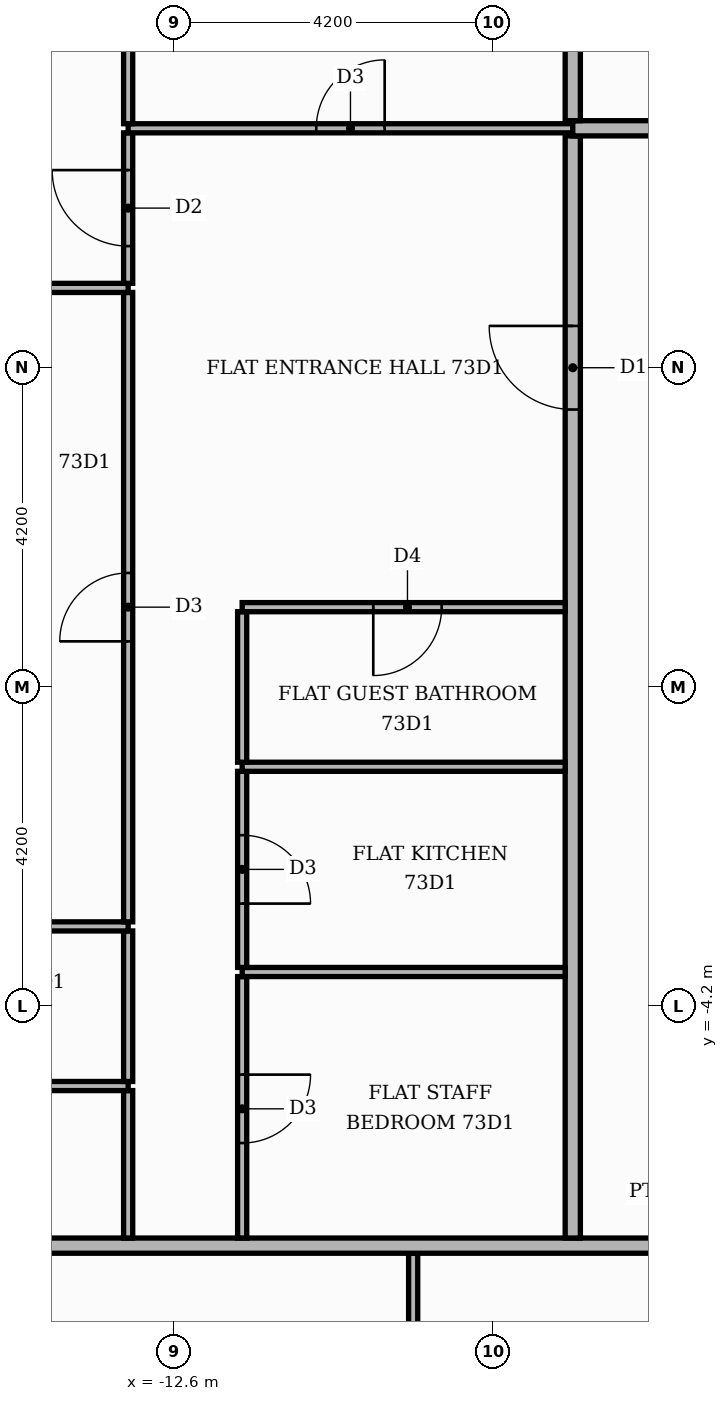
"""IFC4 building model, lengths in metres.
Left out: names, types, materials, properties, quantities, classifications, styles, units other than length and angle.
Written with IfcOpenShell. Run it as: python <this file> out.ifc"""

import sys

from ifc_helpers import new_model, si_unit, direction, frame, frame_2d, origin, place, context, subcontext, project, spatial, rectangle, extrude, element, fill, save


model = new_model("IFC4")
c1 = context("Model", 3, precision=1e-05, world=origin(), true_north=direction((0.0, 1.0)))
c2 = subcontext(c1, "Body", "Model", "MODEL_VIEW")
j1 = project(units=[si_unit("LENGTHUNIT", "METRE"), si_unit("PLANEANGLEUNIT", "RADIAN")], contexts=[c1])
p1 = place(None, origin())
s1 = spatial("IfcSite", under=j1, at=p1, CompositionType="ELEMENT")
p2 = place(p1, origin())
s2 = spatial("IfcBuilding", under=s1, at=p2, CompositionType="ELEMENT")
p3 = place(p2, frame((0.0, 0.0, 304.5)))
s3 = spatial("IfcBuildingStorey", under=s2, at=p3, CompositionType="ELEMENT", Elevation=304.5)
p4 = place(p3, frame((-9.45, -12.84, 0.0), z_axis=(0.0, 0.0, 1.0), x_axis=(0.0, 1.0, 0.0)))
e1 = element("IfcWall", 1, at=p4, inside=s3, PredefinedType="PARTITIONING", context=c2, shape_type="SweptSolid", body=[
    extrude(rectangle(XDim=5.39, YDim=0.12, at=frame_2d((2.695, 0.0))), origin(), (0.0, 0.0, 1.0), 3.55),
])
p5 = place(p4, frame((2.265, 0.0, 0.0)))
e2 = element("IfcOpeningElement", 2, at=p5, cuts=e1, PredefinedType="OPENING", context=c2, shape_type="SweptSolid", body=[
    extrude(rectangle(XDim=0.9, YDim=2.1, at=frame_2d((0.45, 1.05))), frame((0.0, 0.07, 0.0), z_axis=(0.0, -1.0, 0.0), x_axis=(1.0, 0.0, 0.0)), (0.0, 0.0, 1.0), 0.14),
])
p6 = place(p3, frame((-18.5, -7.35, 0.0), z_axis=(0.0, 0.0, 1.0), x_axis=(1.0, 0.0, 0.0)))
e3 = element("IfcWall", 3, at=p6, inside=s3, PredefinedType="PARTITIONING", context=c2, shape_type="SweptSolid", body=[
    extrude(rectangle(XDim=25.85, YDim=0.2, at=frame_2d((12.925, 0.0))), origin(), (0.0, 0.0, 1.0), 3.55),
])
p7 = place(p6, frame((12.7, 0.0, 0.0)))
e4 = element("IfcOpeningElement", 4, at=p7, cuts=e3, PredefinedType="OPENING", context=c2, shape_type="SweptSolid", body=[
    extrude(rectangle(XDim=1.1, YDim=2.4, at=frame_2d((0.55, 1.2))), frame((0.0, 0.11, 0.0), z_axis=(0.0, -1.0, 0.0), x_axis=(1.0, 0.0, 0.0)), (0.0, 0.0, 1.0), 0.22),
])
p8 = place(p3, frame((-13.2, -7.25, 0.0), z_axis=(0.0, 0.0, 1.0), x_axis=(0.0, 1.0, 0.0)))
e5 = element("IfcWall", 5, at=p8, inside=s3, PredefinedType="PARTITIONING", context=c2, shape_type="SweptSolid", body=[
    extrude(rectangle(XDim=1.94, YDim=0.12, at=frame_2d((0.97, 0.0))), origin(), (0.0, 0.0, 1.0), 3.55),
])
p9 = place(p3, frame((-11.7, -7.25, 0.0), z_axis=(0.0, 0.0, 1.0), x_axis=(0.0, 1.0, 0.0)))
e6 = element("IfcWall", 6, at=p9, inside=s3, PredefinedType="PARTITIONING", context=c2, shape_type="SweptSolid", body=[
    extrude(rectangle(XDim=3.44, YDim=0.12, at=frame_2d((1.72, 0.0))), origin(), (0.0, 0.0, 1.0), 3.55),
])
p10 = place(p9, frame((1.25, 0.0, 0.0)))
e7 = element("IfcOpeningElement", 7, at=p10, cuts=e6, PredefinedType="OPENING", context=c2, shape_type="SweptSolid", body=[
    extrude(rectangle(XDim=0.9, YDim=2.1, at=frame_2d((0.45, 1.05))), frame((0.0, 0.07, 0.0), z_axis=(0.0, -1.0, 0.0), x_axis=(1.0, 0.0, 0.0)), (0.0, 0.0, 1.0), 0.14),
])
p11 = place(p3, frame((-7.35, -7.25, 0.0), z_axis=(0.0, 0.0, 1.0), x_axis=(0.0, 1.0, 0.0)))
e8 = element("IfcWall", 8, at=p11, inside=s3, PredefinedType="PARTITIONING", context=c2, shape_type="SweptSolid", body=[
    extrude(rectangle(XDim=14.5, YDim=0.2, at=frame_2d((7.25, 0.0))), origin(), (0.0, 0.0, 1.0), 3.55),
])
p12 = place(p11, frame((10.9, 0.0, 0.0)))
e9 = element("IfcOpeningElement", 9, at=p12, cuts=e8, PredefinedType="OPENING", context=c2, shape_type="SweptSolid", body=[
    extrude(rectangle(XDim=1.1, YDim=2.4, at=frame_2d((0.55, 1.2))), frame((0.0, 0.11, 0.0), z_axis=(0.0, -1.0, 0.0), x_axis=(1.0, 0.0, 0.0)), (0.0, 0.0, 1.0), 0.22),
])
p13 = place(p3, frame((-18.5, -5.25, 0.0), z_axis=(0.0, 0.0, 1.0), x_axis=(1.0, 0.0, 0.0)))
e10 = element("IfcWall", 10, at=p13, inside=s3, PredefinedType="PARTITIONING", context=c2, shape_type="SweptSolid", body=[
    extrude(rectangle(XDim=5.3, YDim=0.12, at=frame_2d((2.65, 0.0))), origin(), (0.0, 0.0, 1.0), 3.55),
])
p14 = place(p13, frame((2.05, 0.0, 0.0)))
e11 = element("IfcOpeningElement", 11, at=p14, cuts=e10, PredefinedType="OPENING", context=c2, shape_type="SweptSolid", body=[
    extrude(rectangle(XDim=0.9, YDim=2.1, at=frame_2d((0.45, 1.05))), frame((0.0, 0.07, 0.0), z_axis=(0.0, -1.0, 0.0), x_axis=(1.0, 0.0, 0.0)), (0.0, 0.0, 1.0), 0.14),
])
p15 = place(p3, frame((-13.2, -5.19, 0.0), z_axis=(0.0, 0.0, 1.0), x_axis=(0.0, 1.0, 0.0)))
e12 = element("IfcWall", 12, at=p15, inside=s3, PredefinedType="PARTITIONING", context=c2, shape_type="SweptSolid", body=[
    extrude(rectangle(XDim=1.98, YDim=0.12, at=frame_2d((0.99, 0.0))), origin(), (0.0, 0.0, 1.0), 3.55),
])
p16 = place(p3, frame((-11.7, -3.75, 0.0), z_axis=(0.0, 0.0, 1.0), x_axis=(1.0, 0.0, 0.0)))
e13 = element("IfcWall", 13, at=p16, inside=s3, PredefinedType="PARTITIONING", context=c2, shape_type="SweptSolid", body=[
    extrude(rectangle(XDim=4.25, YDim=0.12, at=frame_2d((2.125, 0.0))), origin(), (0.0, 0.0, 1.0), 3.55),
])
p17 = place(p3, frame((-11.7, -3.69, 0.0), z_axis=(0.0, 0.0, 1.0), x_axis=(0.0, 1.0, 0.0)))
e14 = element("IfcWall", 14, at=p17, inside=s3, PredefinedType="PARTITIONING", context=c2, shape_type="SweptSolid", body=[
    extrude(rectangle(XDim=2.58, YDim=0.12, at=frame_2d((1.29, 0.0))), origin(), (0.0, 0.0, 1.0), 3.55),
])
p18 = place(p17, frame((0.84, 0.0, 0.0)))
e15 = element("IfcOpeningElement", 15, at=p18, cuts=e14, PredefinedType="OPENING", context=c2, shape_type="SweptSolid", body=[
    extrude(rectangle(XDim=0.9, YDim=2.1, at=frame_2d((0.45, 1.05))), frame((0.0, 0.07, 0.0), z_axis=(0.0, -1.0, 0.0), x_axis=(1.0, 0.0, 0.0)), (0.0, 0.0, 1.0), 0.14),
])
p19 = place(p3, frame((-18.5, -3.15, 0.0), z_axis=(0.0, 0.0, 1.0), x_axis=(1.0, 0.0, 0.0)))
e16 = element("IfcWall", 16, at=p19, inside=s3, PredefinedType="PARTITIONING", context=c2, shape_type="SweptSolid", body=[
    extrude(rectangle(XDim=5.3, YDim=0.12, at=frame_2d((2.65, 0.0))), origin(), (0.0, 0.0, 1.0), 3.55),
])
p20 = place(p19, frame((2.05, 0.0, 0.0)))
e17 = element("IfcOpeningElement", 17, at=p20, cuts=e16, PredefinedType="OPENING", context=c2, shape_type="SweptSolid", body=[
    extrude(rectangle(XDim=0.9, YDim=2.1, at=frame_2d((0.45, 1.05))), frame((0.0, 0.07, 0.0), z_axis=(0.0, -1.0, 0.0), x_axis=(1.0, 0.0, 0.0)), (0.0, 0.0, 1.0), 0.14),
])
p21 = place(p3, frame((-13.2, -3.09, 0.0), z_axis=(0.0, 0.0, 1.0), x_axis=(0.0, 1.0, 0.0)))
e18 = element("IfcWall", 18, at=p21, inside=s3, PredefinedType="PARTITIONING", context=c2, shape_type="SweptSolid", body=[
    extrude(rectangle(XDim=8.28, YDim=0.12, at=frame_2d((4.14, 0.0))), origin(), (0.0, 0.0, 1.0), 3.55),
])
p22 = place(p21, frame((3.69, 0.0, 0.0)))
e19 = element("IfcOpeningElement", 19, at=p22, cuts=e18, PredefinedType="OPENING", context=c2, shape_type="SweptSolid", body=[
    extrude(rectangle(XDim=0.9, YDim=2.1, at=frame_2d((0.45, 1.05))), frame((0.0, 0.07, 0.0), z_axis=(0.0, -1.0, 0.0), x_axis=(1.0, 0.0, 0.0)), (0.0, 0.0, 1.0), 0.14),
])
p23 = place(p3, frame((-11.7, -1.05, 0.0), z_axis=(0.0, 0.0, 1.0), x_axis=(1.0, 0.0, 0.0)))
e20 = element("IfcWall", 20, at=p23, inside=s3, PredefinedType="PARTITIONING", context=c2, shape_type="SweptSolid", body=[
    extrude(rectangle(XDim=4.25, YDim=0.12, at=frame_2d((2.125, 0.0))), origin(), (0.0, 0.0, 1.0), 3.55),
])
p24 = place(p3, frame((-11.7, -0.99, 0.0), z_axis=(0.0, 0.0, 1.0), x_axis=(0.0, 1.0, 0.0)))
e21 = element("IfcWall", 21, at=p24, inside=s3, PredefinedType="PARTITIONING", context=c2, shape_type="SweptSolid", body=[
    extrude(rectangle(XDim=1.98, YDim=0.12, at=frame_2d((0.99, 0.0))), origin(), (0.0, 0.0, 1.0), 3.55),
])
p25 = place(p3, frame((-11.7, 1.05, 0.0), z_axis=(0.0, 0.0, 1.0), x_axis=(1.0, 0.0, 0.0)))
e22 = element("IfcWall", 22, at=p25, inside=s3, PredefinedType="PARTITIONING", context=c2, shape_type="SweptSolid", body=[
    extrude(rectangle(XDim=4.25, YDim=0.12, at=frame_2d((2.125, 0.0))), origin(), (0.0, 0.0, 1.0), 3.55),
])
p26 = place(p25, frame((1.725, 0.0, 0.0)))
e23 = element("IfcOpeningElement", 23, at=p26, cuts=e22, PredefinedType="OPENING", context=c2, shape_type="SweptSolid", body=[
    extrude(rectangle(XDim=0.9, YDim=2.1, at=frame_2d((0.45, 1.05))), frame((0.0, 0.07, 0.0), z_axis=(0.0, -1.0, 0.0), x_axis=(1.0, 0.0, 0.0)), (0.0, 0.0, 1.0), 0.14),
])
p27 = place(p3, frame((-18.5, 5.25, 0.0), z_axis=(0.0, 0.0, 1.0), x_axis=(1.0, 0.0, 0.0)))
e24 = element("IfcWall", 24, at=p27, inside=s3, PredefinedType="PARTITIONING", context=c2, shape_type="SweptSolid", body=[
    extrude(rectangle(XDim=5.3, YDim=0.12, at=frame_2d((2.65, 0.0))), origin(), (0.0, 0.0, 1.0), 3.55),
])
p28 = place(p3, frame((-13.2, 5.31, 0.0), z_axis=(0.0, 0.0, 1.0), x_axis=(0.0, 1.0, 0.0)))
e25 = element("IfcWall", 25, at=p28, inside=s3, PredefinedType="PARTITIONING", context=c2, shape_type="SweptSolid", body=[
    extrude(rectangle(XDim=1.98, YDim=0.12, at=frame_2d((0.99, 0.0))), origin(), (0.0, 0.0, 1.0), 3.55),
])
p29 = place(p28, frame((0.49, 0.0, 0.0)))
e26 = element("IfcOpeningElement", 26, at=p29, cuts=e25, PredefinedType="OPENING", context=c2, shape_type="SweptSolid", body=[
    extrude(rectangle(XDim=1.0, YDim=2.1, at=frame_2d((0.5, 1.05))), frame((0.0, 0.07, 0.0), z_axis=(0.0, -1.0, 0.0), x_axis=(1.0, 0.0, 0.0)), (0.0, 0.0, 1.0), 0.14),
])
p30 = place(p3, frame((-13.2, 7.35, 0.0), z_axis=(0.0, 0.0, 1.0), x_axis=(1.0, 0.0, 0.0)))
e27 = element("IfcWall", 27, at=p30, inside=s3, PredefinedType="PARTITIONING", context=c2, shape_type="SweptSolid", body=[
    extrude(rectangle(XDim=5.85, YDim=0.12, at=frame_2d((2.925, 0.0))), origin(), (0.0, 0.0, 1.0), 3.55),
])
p31 = place(p30, frame((2.475, 0.0, 0.0)))
e28 = element("IfcOpeningElement", 28, at=p31, cuts=e27, PredefinedType="OPENING", context=c2, shape_type="SweptSolid", body=[
    extrude(rectangle(XDim=0.9, YDim=2.1, at=frame_2d((0.45, 1.05))), frame((0.0, 0.07, 0.0), z_axis=(0.0, -1.0, 0.0), x_axis=(1.0, 0.0, 0.0)), (0.0, 0.0, 1.0), 0.14),
])
p32 = place(p3, frame((-7.35, 7.35, 0.0), z_axis=(0.0, 0.0, 1.0), x_axis=(1.0, 0.0, 0.0)))
e29 = element("IfcWall", 29, at=p32, inside=s3, PredefinedType="PARTITIONING", context=c2, shape_type="SweptSolid", body=[
    extrude(rectangle(XDim=1.85, YDim=0.2, at=frame_2d((0.925, 0.0))), origin(), (0.0, 0.0, 1.0), 3.55),
])
p33 = place(p3, frame((-13.2, 7.41, 0.0), z_axis=(0.0, 0.0, 1.0), x_axis=(0.0, 1.0, 0.0)))
e30 = element("IfcWall", 30, at=p33, inside=s3, PredefinedType="PARTITIONING", context=c2, shape_type="SweptSolid", body=[
    extrude(rectangle(XDim=4.69, YDim=0.12, at=frame_2d((2.345, 0.0))), origin(), (0.0, 0.0, 1.0), 3.55),
])
p34 = place(p3, frame((-7.35, 7.45, 0.0), z_axis=(0.0, 0.0, 1.0), x_axis=(0.0, 1.0, 0.0)))
e31 = element("IfcWall", 31, at=p34, inside=s3, PredefinedType="PARTITIONING", context=c2, shape_type="SweptSolid", body=[
    extrude(rectangle(XDim=11.05, YDim=0.2, at=frame_2d((5.525, 0.0))), origin(), (0.0, 0.0, 1.0), 3.55),
])
p35 = place(p12, origin())
e32 = element("IfcDoor", 32, at=p35, inside=s3, OperationType="SINGLE_SWING_RIGHT", PredefinedType="DOOR", context=c2, shape_type="SweptSolid", body=[
    extrude(rectangle(XDim=1.1, YDim=2.4, at=frame_2d((0.55, 1.2))), frame((0.0, 0.025, 0.0), z_axis=(0.0, -1.0, 0.0), x_axis=(1.0, 0.0, 0.0)), (0.0, 0.0, 1.0), 0.05),
])
fill(e9, e32)
p36 = place(p31, origin())
e33 = element("IfcDoor", 33, at=p36, inside=s3, OperationType="SINGLE_SWING_RIGHT", PredefinedType="DOOR", context=c2, shape_type="SweptSolid", body=[
    extrude(rectangle(XDim=0.9, YDim=2.1, at=frame_2d((0.45, 1.05))), frame((0.0, 0.025, 0.0), z_axis=(0.0, -1.0, 0.0), x_axis=(1.0, 0.0, 0.0)), (0.0, 0.0, 1.0), 0.05),
])
fill(e28, e33)
p37 = place(p26, frame((0.9, 0.0, 0.0), z_axis=(0.0, 0.0, 1.0), x_axis=(-1.0, 0.0, 0.0)))
e34 = element("IfcDoor", 34, at=p37, inside=s3, OperationType="SINGLE_SWING_LEFT", PredefinedType="DOOR", context=c2, shape_type="SweptSolid", body=[
    extrude(rectangle(XDim=0.9, YDim=2.1, at=frame_2d((0.45, 1.05))), frame((0.0, 0.025, 0.0), z_axis=(0.0, -1.0, 0.0), x_axis=(1.0, 0.0, 0.0)), (0.0, 0.0, 1.0), 0.05),
])
fill(e23, e34)
p38 = place(p18, frame((0.9, 0.0, 0.0), z_axis=(0.0, 0.0, 1.0), x_axis=(-1.0, 0.0, 0.0)))
e35 = element("IfcDoor", 35, at=p38, inside=s3, OperationType="SINGLE_SWING_LEFT", PredefinedType="DOOR", context=c2, shape_type="SweptSolid", body=[
    extrude(rectangle(XDim=0.9, YDim=2.1, at=frame_2d((0.45, 1.05))), frame((0.0, 0.025, 0.0), z_axis=(0.0, -1.0, 0.0), x_axis=(1.0, 0.0, 0.0)), (0.0, 0.0, 1.0), 0.05),
])
fill(e15, e35)
p39 = place(p10, frame((0.9, 0.0, 0.0), z_axis=(0.0, 0.0, 1.0), x_axis=(-1.0, 0.0, 0.0)))
e36 = element("IfcDoor", 36, at=p39, inside=s3, OperationType="SINGLE_SWING_RIGHT", PredefinedType="DOOR", context=c2, shape_type="SweptSolid", body=[
    extrude(rectangle(XDim=0.9, YDim=2.1, at=frame_2d((0.45, 1.05))), frame((0.0, 0.025, 0.0), z_axis=(0.0, -1.0, 0.0), x_axis=(1.0, 0.0, 0.0)), (0.0, 0.0, 1.0), 0.05),
])
fill(e7, e36)
p40 = place(p29, origin())
e37 = element("IfcDoor", 37, at=p40, inside=s3, OperationType="SINGLE_SWING_RIGHT", PredefinedType="DOOR", context=c2, shape_type="SweptSolid", body=[
    extrude(rectangle(XDim=1.0, YDim=2.1, at=frame_2d((0.5, 1.05))), frame((0.0, 0.025, 0.0), z_axis=(0.0, -1.0, 0.0), x_axis=(1.0, 0.0, 0.0)), (0.0, 0.0, 1.0), 0.05),
])
fill(e26, e37)
p41 = place(p22, origin())
e38 = element("IfcDoor", 38, at=p41, inside=s3, OperationType="SINGLE_SWING_LEFT", PredefinedType="DOOR", context=c2, shape_type="SweptSolid", body=[
    extrude(rectangle(XDim=0.9, YDim=2.1, at=frame_2d((0.45, 1.05))), frame((0.0, 0.025, 0.0), z_axis=(0.0, -1.0, 0.0), x_axis=(1.0, 0.0, 0.0)), (0.0, 0.0, 1.0), 0.05),
])
fill(e19, e38)
save(model, sys.argv[1])
